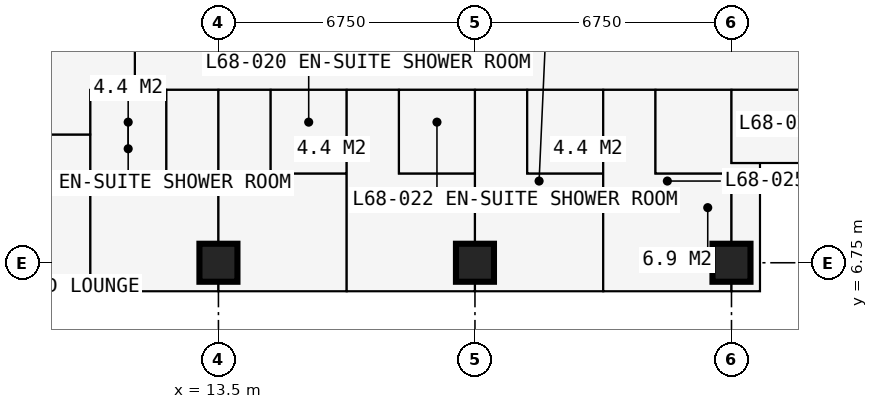
"""IFC4 building model, lengths in metres.
Left out: names, types, materials, properties, quantities, classifications, styles, units other than length and angle.
Written with IfcOpenShell. Run it as: python <this file> out.ifc"""

import sys

from ifc_helpers import new_model, si_unit, direction, frame, frame_2d, origin, origin_2d, place, context, subcontext, project, spatial, rectangle, extrude, element, fill, save


model = new_model("IFC4")
c1 = context("Model", 3, precision=1e-05, world=origin(), true_north=direction((0.0, 1.0)))
c2 = subcontext(c1, "Body", "Model", "MODEL_VIEW")
j1 = project(units=[si_unit("LENGTHUNIT", "METRE"), si_unit("PLANEANGLEUNIT", "RADIAN")], contexts=[c1])
p1 = place(None, origin())
s1 = spatial("IfcSite", under=j1, at=p1, CompositionType="ELEMENT")
p2 = place(p1, origin())
s2 = spatial("IfcBuilding", under=s1, at=p2, CompositionType="ELEMENT")
p3 = place(p2, frame((0.0, 0.0, 251.1)))
s3 = spatial("IfcBuildingStorey", under=s2, at=p3, CompositionType="ELEMENT", Elevation=251.1)
for number, where, z_axis, x_axis in (
    (1, (13.5, 6.75, 0.0), (0.0, 0.0, 1.0), (1.0, 0.0, 0.0)),
    (2, (20.25, 6.75, 0.0), (0.0, 0.0, 1.0), (1.0, 0.0, 0.0)),
    (3, (27.0, 6.75, 0.0), (0.0, 0.0, 1.0), (1.0, 0.0, 0.0)),
):
    element("IfcColumn", number, at=place(p3, frame(where, z_axis=z_axis, x_axis=x_axis)), inside=s3, PredefinedType="COLUMN", context=c2, shape_type="SweptSolid", body=[
        extrude(rectangle(XDim=1.0, YDim=1.0, at=origin_2d()), origin(), (0.0, 0.0, 1.0), 3.6),
    ])
p4 = place(p3, frame((20.25, 6.0, 0.0), z_axis=(0.0, 0.0, 1.0), x_axis=(-1.0, 0.0, 0.0)))
e4 = element("IfcWall", 4, at=p4, inside=s3, PredefinedType="SOLIDWALL", context=c2, shape_type="SweptSolid", body=[
    extrude(rectangle(XDim=6.75, YDim=0.15, at=frame_2d((3.375, 0.0))), origin(), (0.0, 0.0, 1.0), 3.3),
])
p5 = place(p4, frame((0.363, 0.0, 0.0)))
e5 = element("IfcOpeningElement", 5, at=p5, cuts=e4, PredefinedType="OPENING", context=c2, shape_type="SweptSolid", body=[
    extrude(rectangle(XDim=1.0, YDim=2.2, at=frame_2d((0.5, 1.1))), frame((0.0, 0.085, 0.0), z_axis=(0.0, -1.0, 0.0), x_axis=(1.0, 0.0, 0.0)), (0.0, 0.0, 1.0), 0.17),
])
p6 = place(p4, frame((1.725, 0.0, 0.9)))
e6 = element("IfcOpeningElement", 6, at=p6, cuts=e4, PredefinedType="OPENING", context=c2, shape_type="SweptSolid", body=[
    extrude(rectangle(XDim=1.2, YDim=1.8, at=frame_2d((0.6, 0.9))), frame((0.0, 0.085, 0.0), z_axis=(0.0, -1.0, 0.0), x_axis=(1.0, 0.0, 0.0)), (0.0, 0.0, 1.0), 0.17),
])
p7 = place(p4, frame((5.387, 0.0, 0.0)))
e7 = element("IfcOpeningElement", 7, at=p7, cuts=e4, PredefinedType="OPENING", context=c2, shape_type="SweptSolid", body=[
    extrude(rectangle(XDim=1.0, YDim=2.2, at=frame_2d((0.5, 1.1))), frame((0.0, 0.085, 0.0), z_axis=(0.0, -1.0, 0.0), x_axis=(1.0, 0.0, 0.0)), (0.0, 0.0, 1.0), 0.17),
])
p8 = place(p4, frame((3.825, 0.0, 0.9)))
e8 = element("IfcOpeningElement", 8, at=p8, cuts=e4, PredefinedType="OPENING", context=c2, shape_type="SweptSolid", body=[
    extrude(rectangle(XDim=1.2, YDim=1.8, at=frame_2d((0.6, 0.9))), frame((0.0, 0.085, 0.0), z_axis=(0.0, -1.0, 0.0), x_axis=(1.0, 0.0, 0.0)), (0.0, 0.0, 1.0), 0.17),
])
p9 = place(p3, frame((27.75, 6.0, 0.0), z_axis=(0.0, 0.0, 1.0), x_axis=(0.0, 1.0, 0.0)))
e9 = element("IfcWall", 9, at=p9, inside=s3, PredefinedType="SOLIDWALL", context=c2, shape_type="SweptSolid", body=[
    extrude(rectangle(XDim=3.375, YDim=0.3, at=frame_2d((1.688, 0.0))), origin(), (0.0, 0.0, 1.0), 3.3),
])
p10 = place(p9, frame((0.788, 0.0, 0.6)))
e10 = element("IfcOpeningElement", 10, at=p10, cuts=e9, PredefinedType="OPENING", context=c2, shape_type="SweptSolid", body=[
    extrude(rectangle(XDim=1.8, YDim=2.1, at=frame_2d((0.9, 1.05))), frame((0.0, 0.16, 0.0), z_axis=(0.0, -1.0, 0.0), x_axis=(1.0, 0.0, 0.0)), (0.0, 0.0, 1.0), 0.32),
])
p11 = place(p3, frame((27.75, 9.375, 0.0), z_axis=(0.0, 0.0, 1.0), x_axis=(1.0, 0.0, 0.0)))
e11 = element("IfcWall", 11, at=p11, inside=s3, PredefinedType="SOLIDWALL", context=c2, shape_type="SweptSolid", body=[
    extrude(rectangle(XDim=3.375, YDim=0.3, at=frame_2d((1.688, 0.0))), origin(), (0.0, 0.0, 1.0), 3.3),
])
p12 = place(p11, frame((0.788, 0.0, 0.6)))
e12 = element("IfcOpeningElement", 12, at=p12, cuts=e11, PredefinedType="OPENING", context=c2, shape_type="SweptSolid", body=[
    extrude(rectangle(XDim=1.8, YDim=2.1, at=frame_2d((0.9, 1.05))), frame((0.0, 0.16, 0.0), z_axis=(0.0, -1.0, 0.0), x_axis=(1.0, 0.0, 0.0)), (0.0, 0.0, 1.0), 0.32),
])
p13 = place(p3, frame((16.875, 5.9, 0.0), z_axis=(0.0, 0.0, 1.0), x_axis=(0.0, -1.0, 0.0)))
e13 = element("IfcWall", 13, at=p13, inside=s3, PredefinedType="USERDEFINED", context=c2, shape_type="SweptSolid", body=[
    extrude(rectangle(XDim=2.2, YDim=1.0, at=frame_2d((1.1, 0.0))), origin(), (0.0, 0.0, 1.0), 0.9),
])
p14 = place(p3, frame((2.775, 10.125, 0.0), z_axis=(0.0, 0.0, 1.0), x_axis=(1.0, 0.0, 0.0)))
e14 = element("IfcWall", 14, at=p14, inside=s3, PredefinedType="PARTITIONING", context=c2, shape_type="SweptSolid", body=[
    extrude(rectangle(XDim=7.35, YDim=0.15, at=frame_2d((3.675, 0.0))), origin(), (0.0, 0.0, 1.0), 2.802),
])
p15 = place(p14, frame((1.016, 0.0, 0.0)))
e15 = element("IfcOpeningElement", 15, at=p15, cuts=e14, PredefinedType="OPENING", context=c2, shape_type="SweptSolid", body=[
    extrude(rectangle(XDim=1.0, YDim=2.2, at=frame_2d((0.5, 1.1))), frame((0.0, 0.085, 0.0), z_axis=(0.0, -1.0, 0.0), x_axis=(1.0, 0.0, 0.0)), (0.0, 0.0, 1.0), 0.17),
])
p16 = place(p3, frame((10.125, 6.016, 0.0), z_axis=(0.0, 0.0, 1.0), x_axis=(0.0, 1.0, 0.0)))
e16 = element("IfcWall", 16, at=p16, inside=s3, PredefinedType="PARTITIONING", context=c2, shape_type="SweptSolid", body=[
    extrude(rectangle(XDim=5.284, YDim=0.15, at=frame_2d((2.642, 0.0))), origin(), (0.0, 0.0, 1.0), 3.3),
])
p17 = place(p16, frame((1.05, 0.0, 0.0)))
e17 = element("IfcOpeningElement", 17, at=p17, cuts=e16, PredefinedType="OPENING", context=c2, shape_type="SweptSolid", body=[
    extrude(rectangle(XDim=0.95, YDim=2.2, at=frame_2d((0.475, 1.1))), frame((0.0, 0.085, 0.0), z_axis=(0.0, -1.0, 0.0), x_axis=(1.0, 0.0, 0.0)), (0.0, 0.0, 1.0), 0.17),
])
p18 = place(p3, frame((10.125, 9.1, 0.0), z_axis=(0.0, 0.0, 1.0), x_axis=(1.0, 0.0, 0.0)))
e18 = element("IfcWall", 18, at=p18, inside=s3, PredefinedType="PARTITIONING", context=c2, shape_type="SweptSolid", body=[
    extrude(rectangle(XDim=2.0, YDim=0.1, at=frame_2d((1.0, 0.0))), origin(), (0.0, 0.0, 1.0), 3.3),
])
p19 = place(p3, frame((10.125, 11.3, 0.0), z_axis=(0.0, 0.0, 1.0), x_axis=(1.0, 0.0, 0.0)))
e19 = element("IfcWall", 19, at=p19, inside=s3, PredefinedType="PARTITIONING", context=c2, shape_type="SweptSolid", body=[
    extrude(rectangle(XDim=20.984, YDim=0.15, at=frame_2d((10.492, 0.0))), origin(), (0.0, 0.0, 1.0), 3.3),
])
p20 = place(p19, frame((3.625, 0.0, 0.0)))
e20 = element("IfcOpeningElement", 20, at=p20, cuts=e19, PredefinedType="OPENING", context=c2, shape_type="SweptSolid", body=[
    extrude(rectangle(XDim=0.95, YDim=2.2, at=frame_2d((0.475, 1.1))), frame((0.0, 0.085, 0.0), z_axis=(0.0, -1.0, 0.0), x_axis=(1.0, 0.0, 0.0)), (0.0, 0.0, 1.0), 0.17),
])
p21 = place(p19, frame((7.0, 0.0, 0.0)))
e21 = element("IfcOpeningElement", 21, at=p21, cuts=e19, PredefinedType="OPENING", context=c2, shape_type="SweptSolid", body=[
    extrude(rectangle(XDim=0.95, YDim=2.2, at=frame_2d((0.475, 1.1))), frame((0.0, 0.085, 0.0), z_axis=(0.0, -1.0, 0.0), x_axis=(1.0, 0.0, 0.0)), (0.0, 0.0, 1.0), 0.17),
])
p22 = place(p19, frame((10.375, 0.0, 0.0)))
e22 = element("IfcOpeningElement", 22, at=p22, cuts=e19, PredefinedType="OPENING", context=c2, shape_type="SweptSolid", body=[
    extrude(rectangle(XDim=0.95, YDim=2.2, at=frame_2d((0.475, 1.1))), frame((0.0, 0.085, 0.0), z_axis=(0.0, -1.0, 0.0), x_axis=(1.0, 0.0, 0.0)), (0.0, 0.0, 1.0), 0.17),
])
p23 = place(p19, frame((13.75, 0.0, 0.0)))
e23 = element("IfcOpeningElement", 23, at=p23, cuts=e19, PredefinedType="OPENING", context=c2, shape_type="SweptSolid", body=[
    extrude(rectangle(XDim=0.95, YDim=2.2, at=frame_2d((0.475, 1.1))), frame((0.0, 0.085, 0.0), z_axis=(0.0, -1.0, 0.0), x_axis=(1.0, 0.0, 0.0)), (0.0, 0.0, 1.0), 0.17),
])
p24 = place(p19, frame((17.475, 0.0, 0.0)))
e24 = element("IfcOpeningElement", 24, at=p24, cuts=e19, PredefinedType="OPENING", context=c2, shape_type="SweptSolid", body=[
    extrude(rectangle(XDim=1.0, YDim=2.2, at=frame_2d((0.5, 1.1))), frame((0.0, 0.085, 0.0), z_axis=(0.0, -1.0, 0.0), x_axis=(1.0, 0.0, 0.0)), (0.0, 0.0, 1.0), 0.17),
])
p25 = place(p3, frame((11.3, 11.3, 0.0), z_axis=(0.0, 0.0, 1.0), x_axis=(0.0, 1.0, 0.0)))
e25 = element("IfcWall", 25, at=p25, inside=s3, PredefinedType="PARTITIONING", context=c2, shape_type="SweptSolid", body=[
    extrude(rectangle(XDim=19.075, YDim=0.15, at=frame_2d((9.538, 0.0))), origin(), (0.0, 0.0, 1.0), 3.3),
])
p26 = place(p25, frame((13.95, 0.0, 0.0)))
e26 = element("IfcOpeningElement", 26, at=p26, cuts=e25, PredefinedType="OPENING", context=c2, shape_type="SweptSolid", body=[
    extrude(rectangle(XDim=1.0, YDim=2.2, at=frame_2d((0.5, 1.1))), frame((0.0, 0.085, 0.0), z_axis=(0.0, -1.0, 0.0), x_axis=(1.0, 0.0, 0.0)), (0.0, 0.0, 1.0), 0.17),
])
p27 = place(p3, frame((12.125, 9.1, 0.0), z_axis=(0.0, 0.0, 1.0), x_axis=(0.0, 1.0, 0.0)))
e27 = element("IfcWall", 27, at=p27, inside=s3, PredefinedType="PARTITIONING", context=c2, shape_type="SweptSolid", body=[
    extrude(rectangle(XDim=2.2, YDim=0.1, at=frame_2d((1.1, 0.0))), origin(), (0.0, 0.0, 1.0), 3.3),
])
p28 = place(p27, frame((0.65, 0.0, 0.0)))
e28 = element("IfcOpeningElement", 28, at=p28, cuts=e27, PredefinedType="OPENING", context=c2, shape_type="SweptSolid", body=[
    extrude(rectangle(XDim=0.9, YDim=2.2, at=frame_2d((0.45, 1.1))), frame((0.0, 0.06, 0.0), z_axis=(0.0, -1.0, 0.0), x_axis=(1.0, 0.0, 0.0)), (0.0, 0.0, 1.0), 0.12),
])
p29 = place(p3, frame((13.5, 6.016, 0.0), z_axis=(0.0, 0.0, 1.0), x_axis=(0.0, 1.0, 0.0)))
e29 = element("IfcWall", 29, at=p29, inside=s3, PredefinedType="PARTITIONING", context=c2, shape_type="SweptSolid", body=[
    extrude(rectangle(XDim=5.284, YDim=0.175, at=frame_2d((2.642, 0.0))), origin(), (0.0, 0.0, 1.0), 2.802),
])
p30 = place(p3, frame((14.875, 9.1, 0.0), z_axis=(0.0, 0.0, 1.0), x_axis=(0.0, 1.0, 0.0)))
e30 = element("IfcWall", 30, at=p30, inside=s3, PredefinedType="PARTITIONING", context=c2, shape_type="SweptSolid", body=[
    extrude(rectangle(XDim=2.2, YDim=0.1, at=frame_2d((1.1, 0.0))), origin(), (0.0, 0.0, 1.0), 3.3),
])
p31 = place(p30, frame((0.65, 0.0, 0.0)))
e31 = element("IfcOpeningElement", 31, at=p31, cuts=e30, PredefinedType="OPENING", context=c2, shape_type="SweptSolid", body=[
    extrude(rectangle(XDim=0.9, YDim=2.2, at=frame_2d((0.45, 1.1))), frame((0.0, 0.06, 0.0), z_axis=(0.0, -1.0, 0.0), x_axis=(1.0, 0.0, 0.0)), (0.0, 0.0, 1.0), 0.12),
])
p32 = place(p3, frame((14.875, 9.1, 0.0), z_axis=(0.0, 0.0, 1.0), x_axis=(1.0, 0.0, 0.0)))
e32 = element("IfcWall", 32, at=p32, inside=s3, PredefinedType="PARTITIONING", context=c2, shape_type="SweptSolid", body=[
    extrude(rectangle(XDim=2.0, YDim=0.1, at=frame_2d((1.0, 0.0))), origin(), (0.0, 0.0, 1.0), 3.3),
])
p33 = place(p3, frame((16.875, 6.016, 0.0), z_axis=(0.0, 0.0, 1.0), x_axis=(0.0, 1.0, 0.0)))
e33 = element("IfcWall", 33, at=p33, inside=s3, PredefinedType="PARTITIONING", context=c2, shape_type="SweptSolid", body=[
    extrude(rectangle(XDim=5.284, YDim=0.175, at=frame_2d((2.642, 0.0))), origin(), (0.0, 0.0, 1.0), 3.3),
])
p34 = place(p3, frame((18.25, 9.1, 0.0), z_axis=(0.0, 0.0, 1.0), x_axis=(0.0, 1.0, 0.0)))
e34 = element("IfcWall", 34, at=p34, inside=s3, PredefinedType="PARTITIONING", context=c2, shape_type="SweptSolid", body=[
    extrude(rectangle(XDim=2.2, YDim=0.1, at=frame_2d((1.1, 0.0))), origin(), (0.0, 0.0, 1.0), 3.3),
])
p35 = place(p34, frame((0.65, 0.0, 0.0)))
e35 = element("IfcOpeningElement", 35, at=p35, cuts=e34, PredefinedType="OPENING", context=c2, shape_type="SweptSolid", body=[
    extrude(rectangle(XDim=0.9, YDim=2.2, at=frame_2d((0.45, 1.1))), frame((0.0, 0.06, 0.0), z_axis=(0.0, -1.0, 0.0), x_axis=(1.0, 0.0, 0.0)), (0.0, 0.0, 1.0), 0.12),
])
p36 = place(p3, frame((18.25, 9.1, 0.0), z_axis=(0.0, 0.0, 1.0), x_axis=(1.0, 0.0, 0.0)))
e36 = element("IfcWall", 36, at=p36, inside=s3, PredefinedType="PARTITIONING", context=c2, shape_type="SweptSolid", body=[
    extrude(rectangle(XDim=2.0, YDim=0.1, at=frame_2d((1.0, 0.0))), origin(), (0.0, 0.0, 1.0), 3.3),
])
p37 = place(p3, frame((20.25, 6.016, 0.0), z_axis=(0.0, 0.0, 1.0), x_axis=(0.0, 1.0, 0.0)))
e37 = element("IfcWall", 37, at=p37, inside=s3, PredefinedType="PARTITIONING", context=c2, shape_type="SweptSolid", body=[
    extrude(rectangle(XDim=5.284, YDim=0.175, at=frame_2d((2.642, 0.0))), origin(), (0.0, 0.0, 1.0), 2.802),
])
p38 = place(p3, frame((21.625, 9.1, 0.0), z_axis=(0.0, 0.0, 1.0), x_axis=(0.0, 1.0, 0.0)))
e38 = element("IfcWall", 38, at=p38, inside=s3, PredefinedType="PARTITIONING", context=c2, shape_type="SweptSolid", body=[
    extrude(rectangle(XDim=2.2, YDim=0.1, at=frame_2d((1.1, 0.0))), origin(), (0.0, 0.0, 1.0), 3.3),
])
p39 = place(p38, frame((0.65, 0.0, 0.0)))
e39 = element("IfcOpeningElement", 39, at=p39, cuts=e38, PredefinedType="OPENING", context=c2, shape_type="SweptSolid", body=[
    extrude(rectangle(XDim=0.9, YDim=2.2, at=frame_2d((0.45, 1.1))), frame((0.0, 0.06, 0.0), z_axis=(0.0, -1.0, 0.0), x_axis=(1.0, 0.0, 0.0)), (0.0, 0.0, 1.0), 0.12),
])
p40 = place(p3, frame((21.625, 9.1, 0.0), z_axis=(0.0, 0.0, 1.0), x_axis=(1.0, 0.0, 0.0)))
e40 = element("IfcWall", 40, at=p40, inside=s3, PredefinedType="PARTITIONING", context=c2, shape_type="SweptSolid", body=[
    extrude(rectangle(XDim=2.0, YDim=0.1, at=frame_2d((1.0, 0.0))), origin(), (0.0, 0.0, 1.0), 3.3),
])
p41 = place(p3, frame((23.625, 6.016, 0.0), z_axis=(0.0, 0.0, 1.0), x_axis=(0.0, 1.0, 0.0)))
e41 = element("IfcWall", 41, at=p41, inside=s3, PredefinedType="PARTITIONING", context=c2, shape_type="SweptSolid", body=[
    extrude(rectangle(XDim=5.284, YDim=0.175, at=frame_2d((2.642, 0.0))), origin(), (0.0, 0.0, 1.0), 3.3),
])
p42 = place(p3, frame((25.0, 9.1, 0.0), z_axis=(0.0, 0.0, 1.0), x_axis=(0.0, 1.0, 0.0)))
e42 = element("IfcWall", 42, at=p42, inside=s3, PredefinedType="PARTITIONING", context=c2, shape_type="SweptSolid", body=[
    extrude(rectangle(XDim=2.2, YDim=0.1, at=frame_2d((1.1, 0.0))), origin(), (0.0, 0.0, 1.0), 3.3),
])
p43 = place(p3, frame((25.0, 9.1, 0.0), z_axis=(0.0, 0.0, 1.0), x_axis=(1.0, 0.0, 0.0)))
e43 = element("IfcWall", 43, at=p43, inside=s3, PredefinedType="PARTITIONING", context=c2, shape_type="SweptSolid", body=[
    extrude(rectangle(XDim=2.0, YDim=0.1, at=frame_2d((1.0, 0.0))), origin(), (0.0, 0.0, 1.0), 3.3),
])
p44 = place(p3, frame((27.0, 6.016, 0.0), z_axis=(0.0, 0.0, 1.0), x_axis=(0.0, 1.0, 0.0)))
e44 = element("IfcWall", 44, at=p44, inside=s3, PredefinedType="PARTITIONING", context=c2, shape_type="SweptSolid", body=[
    extrude(rectangle(XDim=3.084, YDim=0.1, at=frame_2d((1.542, 0.0))), origin(), (0.0, 0.0, 1.0), 2.802),
])
p45 = place(p44, frame((1.25, 0.0, 0.0)))
e45 = element("IfcOpeningElement", 45, at=p45, cuts=e44, PredefinedType="OPENING", context=c2, shape_type="SweptSolid", body=[
    extrude(rectangle(XDim=0.9, YDim=2.2, at=frame_2d((0.45, 1.1))), frame((0.0, 0.06, 0.0), z_axis=(0.0, -1.0, 0.0), x_axis=(1.0, 0.0, 0.0)), (0.0, 0.0, 1.0), 0.12),
])
p46 = place(p3, frame((27.0, 9.375, 0.0), z_axis=(0.0, 0.0, 1.0), x_axis=(0.0, 1.0, 0.0)))
e46 = element("IfcWall", 46, at=p46, inside=s3, PredefinedType="PARTITIONING", context=c2, shape_type="SweptSolid", body=[
    extrude(rectangle(XDim=1.925, YDim=0.1, at=frame_2d((0.962, 0.0))), origin(), (0.0, 0.0, 1.0), 2.802),
])
p47 = place(p3, frame((27.0, 9.375, 0.0), z_axis=(0.0, 0.0, 1.0), x_axis=(1.0, 0.0, 0.0)))
e47 = element("IfcWall", 47, at=p47, inside=s3, PredefinedType="PARTITIONING", context=c2, shape_type="SweptSolid", body=[
    extrude(rectangle(XDim=0.734, YDim=0.1, at=frame_2d((0.367, 0.0))), origin(), (0.0, 0.0, 1.0), 3.3),
])
p48 = place(p5, origin())
e48 = element("IfcDoor", 48, at=p48, inside=s3, OperationType="SINGLE_SWING_LEFT", PredefinedType="DOOR", context=c2, shape_type="SweptSolid", body=[
    extrude(rectangle(XDim=1.0, YDim=2.2, at=frame_2d((0.5, 1.1))), frame((0.0, 0.025, 0.0), z_axis=(0.0, -1.0, 0.0), x_axis=(1.0, 0.0, 0.0)), (0.0, 0.0, 1.0), 0.05),
])
fill(e5, e48)
p49 = place(p6, origin())
e49 = element("IfcWindow", 49, at=p49, inside=s3, PartitioningType="SINGLE_PANEL", PredefinedType="WINDOW", context=c2, shape_type="SweptSolid", body=[
    extrude(rectangle(XDim=1.2, YDim=1.8, at=frame_2d((0.6, 0.9))), frame((0.0, 0.03, 0.0), z_axis=(0.0, -1.0, 0.0), x_axis=(1.0, 0.0, 0.0)), (0.0, 0.0, 1.0), 0.06),
])
fill(e6, e49)
p50 = place(p7, origin())
e50 = element("IfcDoor", 50, at=p50, inside=s3, OperationType="SINGLE_SWING_RIGHT", PredefinedType="DOOR", context=c2, shape_type="SweptSolid", body=[
    extrude(rectangle(XDim=1.0, YDim=2.2, at=frame_2d((0.5, 1.1))), frame((0.0, 0.025, 0.0), z_axis=(0.0, -1.0, 0.0), x_axis=(1.0, 0.0, 0.0)), (0.0, 0.0, 1.0), 0.05),
])
fill(e7, e50)
p51 = place(p8, origin())
e51 = element("IfcWindow", 51, at=p51, inside=s3, PartitioningType="SINGLE_PANEL", PredefinedType="WINDOW", context=c2, shape_type="SweptSolid", body=[
    extrude(rectangle(XDim=1.2, YDim=1.8, at=frame_2d((0.6, 0.9))), frame((0.0, 0.03, 0.0), z_axis=(0.0, -1.0, 0.0), x_axis=(1.0, 0.0, 0.0)), (0.0, 0.0, 1.0), 0.06),
])
fill(e8, e51)
p52 = place(p10, origin())
e52 = element("IfcWindow", 52, at=p52, inside=s3, PartitioningType="SINGLE_PANEL", PredefinedType="WINDOW", context=c2, shape_type="SweptSolid", body=[
    extrude(rectangle(XDim=1.8, YDim=2.1, at=frame_2d((0.9, 1.05))), frame((0.0, 0.03, 0.0), z_axis=(0.0, -1.0, 0.0), x_axis=(1.0, 0.0, 0.0)), (0.0, 0.0, 1.0), 0.06),
])
fill(e10, e52)
p53 = place(p12, origin())
e53 = element("IfcWindow", 53, at=p53, inside=s3, PartitioningType="SINGLE_PANEL", PredefinedType="WINDOW", context=c2, shape_type="SweptSolid", body=[
    extrude(rectangle(XDim=1.8, YDim=2.1, at=frame_2d((0.9, 1.05))), frame((0.0, 0.03, 0.0), z_axis=(0.0, -1.0, 0.0), x_axis=(1.0, 0.0, 0.0)), (0.0, 0.0, 1.0), 0.06),
])
fill(e12, e53)
p54 = place(p17, origin())
e54 = element("IfcDoor", 54, at=p54, inside=s3, OperationType="SINGLE_SWING_LEFT", PredefinedType="DOOR", context=c2, shape_type="SweptSolid", body=[
    extrude(rectangle(XDim=0.95, YDim=2.2, at=frame_2d((0.475, 1.1))), frame((0.0, 0.025, 0.0), z_axis=(0.0, -1.0, 0.0), x_axis=(1.0, 0.0, 0.0)), (0.0, 0.0, 1.0), 0.05),
])
fill(e17, e54)
p55 = place(p28, origin())
e55 = element("IfcDoor", 55, at=p55, inside=s3, OperationType="SINGLE_SWING_RIGHT", PredefinedType="DOOR", context=c2, shape_type="SweptSolid", body=[
    extrude(rectangle(XDim=0.9, YDim=2.2, at=frame_2d((0.45, 1.1))), frame((0.0, 0.025, 0.0), z_axis=(0.0, -1.0, 0.0), x_axis=(1.0, 0.0, 0.0)), (0.0, 0.0, 1.0), 0.05),
])
fill(e28, e55)
p56 = place(p20, origin())
e56 = element("IfcDoor", 56, at=p56, inside=s3, OperationType="SINGLE_SWING_LEFT", PredefinedType="DOOR", context=c2, shape_type="SweptSolid", body=[
    extrude(rectangle(XDim=0.95, YDim=2.2, at=frame_2d((0.475, 1.1))), frame((0.0, 0.025, 0.0), z_axis=(0.0, -1.0, 0.0), x_axis=(1.0, 0.0, 0.0)), (0.0, 0.0, 1.0), 0.05),
])
fill(e20, e56)
p57 = place(p31, origin())
e57 = element("IfcDoor", 57, at=p57, inside=s3, OperationType="SINGLE_SWING_RIGHT", PredefinedType="DOOR", context=c2, shape_type="SweptSolid", body=[
    extrude(rectangle(XDim=0.9, YDim=2.2, at=frame_2d((0.45, 1.1))), frame((0.0, 0.025, 0.0), z_axis=(0.0, -1.0, 0.0), x_axis=(1.0, 0.0, 0.0)), (0.0, 0.0, 1.0), 0.05),
])
fill(e31, e57)
p58 = place(p21, origin())
e58 = element("IfcDoor", 58, at=p58, inside=s3, OperationType="SINGLE_SWING_LEFT", PredefinedType="DOOR", context=c2, shape_type="SweptSolid", body=[
    extrude(rectangle(XDim=0.95, YDim=2.2, at=frame_2d((0.475, 1.1))), frame((0.0, 0.025, 0.0), z_axis=(0.0, -1.0, 0.0), x_axis=(1.0, 0.0, 0.0)), (0.0, 0.0, 1.0), 0.05),
])
fill(e21, e58)
p59 = place(p35, origin())
e59 = element("IfcDoor", 59, at=p59, inside=s3, OperationType="SINGLE_SWING_RIGHT", PredefinedType="DOOR", context=c2, shape_type="SweptSolid", body=[
    extrude(rectangle(XDim=0.9, YDim=2.2, at=frame_2d((0.45, 1.1))), frame((0.0, 0.025, 0.0), z_axis=(0.0, -1.0, 0.0), x_axis=(1.0, 0.0, 0.0)), (0.0, 0.0, 1.0), 0.05),
])
fill(e35, e59)
p60 = place(p22, origin())
e60 = element("IfcDoor", 60, at=p60, inside=s3, OperationType="SINGLE_SWING_LEFT", PredefinedType="DOOR", context=c2, shape_type="SweptSolid", body=[
    extrude(rectangle(XDim=0.95, YDim=2.2, at=frame_2d((0.475, 1.1))), frame((0.0, 0.025, 0.0), z_axis=(0.0, -1.0, 0.0), x_axis=(1.0, 0.0, 0.0)), (0.0, 0.0, 1.0), 0.05),
])
fill(e22, e60)
p61 = place(p39, origin())
e61 = element("IfcDoor", 61, at=p61, inside=s3, OperationType="SINGLE_SWING_RIGHT", PredefinedType="DOOR", context=c2, shape_type="SweptSolid", body=[
    extrude(rectangle(XDim=0.9, YDim=2.2, at=frame_2d((0.45, 1.1))), frame((0.0, 0.025, 0.0), z_axis=(0.0, -1.0, 0.0), x_axis=(1.0, 0.0, 0.0)), (0.0, 0.0, 1.0), 0.05),
])
fill(e39, e61)
p62 = place(p23, origin())
e62 = element("IfcDoor", 62, at=p62, inside=s3, OperationType="SINGLE_SWING_LEFT", PredefinedType="DOOR", context=c2, shape_type="SweptSolid", body=[
    extrude(rectangle(XDim=0.95, YDim=2.2, at=frame_2d((0.475, 1.1))), frame((0.0, 0.025, 0.0), z_axis=(0.0, -1.0, 0.0), x_axis=(1.0, 0.0, 0.0)), (0.0, 0.0, 1.0), 0.05),
])
fill(e23, e62)
p63 = place(p45, origin())
e63 = element("IfcDoor", 63, at=p63, inside=s3, OperationType="SINGLE_SWING_RIGHT", PredefinedType="DOOR", context=c2, shape_type="SweptSolid", body=[
    extrude(rectangle(XDim=0.9, YDim=2.2, at=frame_2d((0.45, 1.1))), frame((0.0, 0.025, 0.0), z_axis=(0.0, -1.0, 0.0), x_axis=(1.0, 0.0, 0.0)), (0.0, 0.0, 1.0), 0.05),
])
fill(e45, e63)
p64 = place(p24, origin())
e64 = element("IfcDoor", 64, at=p64, inside=s3, OperationType="SINGLE_SWING_LEFT", PredefinedType="DOOR", context=c2, shape_type="SweptSolid", body=[
    extrude(rectangle(XDim=1.0, YDim=2.2, at=frame_2d((0.5, 1.1))), frame((0.0, 0.025, 0.0), z_axis=(0.0, -1.0, 0.0), x_axis=(1.0, 0.0, 0.0)), (0.0, 0.0, 1.0), 0.05),
])
fill(e24, e64)
save(model, sys.argv[1])
